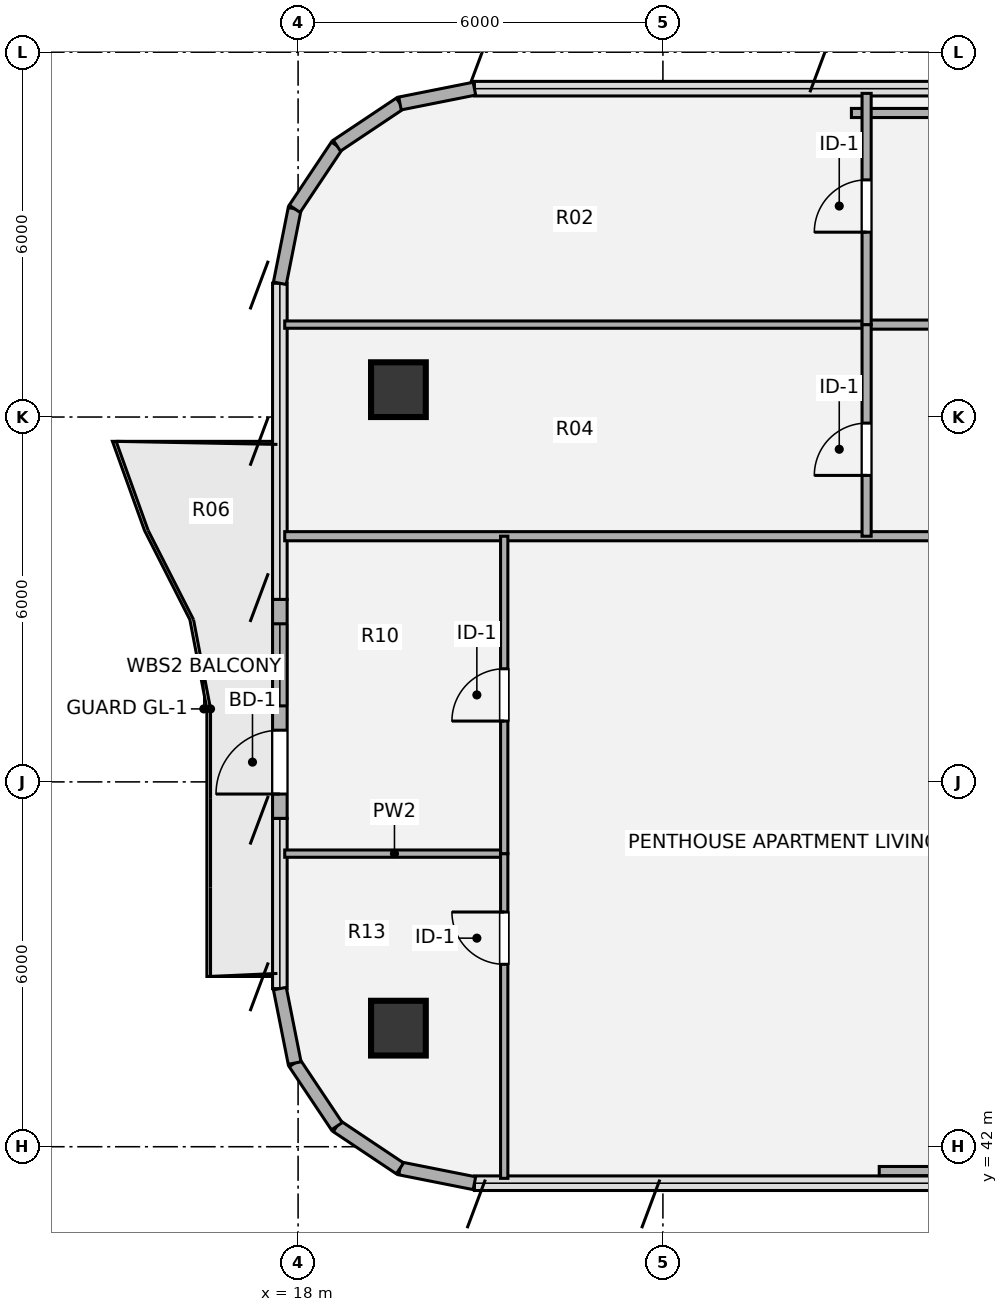
"""IFC4 building model, lengths in metres.
Left out: names, types, materials, properties, quantities, classifications, styles, units other than length and angle.
Written with IfcOpenShell. Run it as: python <this file> out.ifc"""

import sys

from ifc_helpers import new_model, si_unit, direction, frame, frame_2d, origin, origin_2d, place, context, subcontext, project, spatial, rectangle, hollow_circle, extrude, source, transform, mapped, element, fill, save


model = new_model("IFC4")
c1 = context("Model", 3, precision=1e-05, world=origin(), true_north=direction((0.0, 1.0)))
c2 = subcontext(c1, "Body", "Model", "MODEL_VIEW")
j1 = project(units=[si_unit("LENGTHUNIT", "METRE"), si_unit("PLANEANGLEUNIT", "RADIAN")], contexts=[c1])
p1 = place(None, origin())
s1 = spatial("IfcSite", under=j1, at=p1, CompositionType="ELEMENT")
p2 = place(p1, origin())
s2 = spatial("IfcBuilding", under=s1, at=p2, CompositionType="ELEMENT")
p3 = place(p2, frame((0.0, 0.0, 272.16)))
s3 = spatial("IfcBuildingStorey", under=s2, at=p3, CompositionType="ELEMENT", Elevation=272.16)
m1 = source(origin(), c2, "Body", "SweptSolid", [
    extrude(hollow_circle(Radius=0.45, WallThickness=0.032, at=origin_2d()), origin(), (0.0, 0.0, 1.0), 3.78),
])
for number, where, z_axis, x_axis in (
    (1, (19.65, 43.95, 0.0), (0.0, 0.0, 1.0), (1.0, 0.0, 0.0)),
    (2, (19.65, 54.45, 0.0), (0.0, 0.0, 1.0), (1.0, 0.0, 0.0)),
):
    element("IfcColumn", number, at=place(p3, frame(where, z_axis=z_axis, x_axis=x_axis)), inside=s3, PredefinedType="COLUMN", context=c2, shape_type="MappedRepresentation", body=[
        mapped(m1, transform((0.0, 0.0, 0.0), x_axis=(1.0, 0.0, 0.0), y_axis=(0.0, 1.0, 0.0), z_axis=(0.0, 0.0, 1.0), scale=1.0)),
    ])
for number, where, z_axis, x_axis in (
    (3, (20.9, 41.4, 0.0), (0.0, 0.0, 1.0), (-0.981, 0.195, 0.0)),
    (4, (19.675, 41.644, 0.0), (0.0, 0.0, 1.0), (-0.831, 0.556, 0.0)),
    (5, (18.637, 42.337, 0.0), (0.0, 0.0, 1.0), (-0.556, 0.831, 0.0)),
    (6, (17.944, 43.375, 0.0), (0.0, 0.0, 1.0), (-0.195, 0.981, 0.0)),
):
    element("IfcWall", number, at=place(p3, frame(where, z_axis=z_axis, x_axis=x_axis)), inside=s3, PredefinedType="SOLIDWALL", context=c2, shape_type="SweptSolid", body=[
        extrude(rectangle(XDim=1.249, YDim=0.215, at=frame_2d((0.624, 0.0))), origin(), (0.0, 0.0, 1.0), 3.53),
    ])
p4 = place(p3, frame((17.7, 47.4, 0.0), z_axis=(0.0, 0.0, 1.0), x_axis=(0.0, 1.0, 0.0)))
e7 = element("IfcWall", 7, at=p4, inside=s3, PredefinedType="SOLIDWALL", context=c2, shape_type="SweptSolid", body=[
    extrude(rectangle(XDim=3.6, YDim=0.24, at=frame_2d((1.8, 0.0))), origin(), (0.0, 0.0, 1.0), 3.53),
])
p5 = place(p4, frame((0.4, 0.0, 0.0)))
e8 = element("IfcOpeningElement", 8, at=p5, cuts=e7, PredefinedType="OPENING", context=c2, shape_type="SweptSolid", body=[
    extrude(rectangle(XDim=1.05, YDim=2.15, at=origin_2d()), frame((0.525, 0.13, 1.075), z_axis=(0.0, -1.0, 0.0), x_axis=(1.0, 0.0, 0.0)), (0.0, 0.0, 1.0), 0.26),
])
p6 = place(p4, frame((1.85, 0.0, 0.85)))
e9 = element("IfcOpeningElement", 9, at=p6, cuts=e7, PredefinedType="OPENING", context=c2, shape_type="SweptSolid", body=[
    extrude(rectangle(XDim=1.35, YDim=1.35, at=origin_2d()), frame((0.675, 0.13, 0.675), z_axis=(0.0, -1.0, 0.0), x_axis=(1.0, 0.0, 0.0)), (0.0, 0.0, 1.0), 0.26),
])
for number, where, z_axis, x_axis in (
    (10, (17.7, 56.2, 0.0), (0.0, 0.0, 1.0), (0.195, 0.981, 0.0)),
    (11, (17.944, 57.425, 0.0), (0.0, 0.0, 1.0), (0.556, 0.831, 0.0)),
    (12, (18.637, 58.463, 0.0), (0.0, 0.0, 1.0), (0.831, 0.556, 0.0)),
    (13, (19.675, 59.156, 0.0), (0.0, 0.0, 1.0), (0.981, 0.195, 0.0)),
):
    element("IfcWall", number, at=place(p3, frame(where, z_axis=z_axis, x_axis=x_axis)), inside=s3, PredefinedType="SOLIDWALL", context=c2, shape_type="SweptSolid", body=[
        extrude(rectangle(XDim=1.249, YDim=0.215, at=frame_2d((0.624, 0.0))), origin(), (0.0, 0.0, 1.0), 3.53),
    ])
p7 = place(p3, frame((27.558, 41.6, 0.0), z_axis=(0.0, 0.0, 1.0), x_axis=(1.0, 0.0, 0.0)))
e14 = element("IfcWall", 14, at=p7, inside=s3, PredefinedType="PARTITIONING", context=c2, shape_type="SweptSolid", body=[
    extrude(rectangle(XDim=5.992, YDim=0.15, at=frame_2d((2.996, 0.0))), origin(), (0.0, 0.0, 1.0), 3.5),
])
p8 = place(p3, frame((17.78, 46.82, 0.0), z_axis=(0.0, 0.0, 1.0), x_axis=(1.0, 0.0, 0.0)))
e15 = element("IfcWall", 15, at=p8, inside=s3, PredefinedType="PARTITIONING", context=c2, shape_type="SweptSolid", body=[
    extrude(rectangle(XDim=3.61, YDim=0.12, at=frame_2d((1.805, 0.0))), origin(), (0.0, 0.0, 1.0), 2.982),
])
p9 = place(p3, frame((17.78, 52.04, 0.0), z_axis=(0.0, 0.0, 1.0), x_axis=(1.0, 0.0, 0.0)))
e16 = element("IfcWall", 16, at=p9, inside=s3, PredefinedType="PARTITIONING", context=c2, shape_type="SweptSolid", body=[
    extrude(rectangle(XDim=15.77, YDim=0.15, at=frame_2d((7.885, 0.0))), origin(), (0.0, 0.0, 1.0), 2.982),
])
p10 = place(p3, frame((17.78, 55.52, 0.0), z_axis=(0.0, 0.0, 1.0), x_axis=(1.0, 0.0, 0.0)))
e17 = element("IfcWall", 17, at=p10, inside=s3, PredefinedType="PARTITIONING", context=c2, shape_type="SweptSolid", body=[
    extrude(rectangle(XDim=9.57, YDim=0.12, at=frame_2d((4.785, 0.0))), origin(), (0.0, 0.0, 1.0), 3.5),
])
p11 = place(p3, frame((27.35, 55.52, 0.0), z_axis=(0.0, 0.0, 1.0), x_axis=(1.0, 0.0, 0.0)))
e18 = element("IfcWall", 18, at=p11, inside=s3, PredefinedType="PARTITIONING", context=c2, shape_type="SweptSolid", body=[
    extrude(rectangle(XDim=6.2, YDim=0.15, at=frame_2d((3.1, 0.0))), origin(), (0.0, 0.0, 1.0), 3.259),
])
p12 = place(p3, frame((27.1, 59.0, 0.0), z_axis=(0.0, 0.0, 1.0), x_axis=(1.0, 0.0, 0.0)))
e19 = element("IfcWall", 19, at=p12, inside=s3, PredefinedType="PARTITIONING", context=c2, shape_type="SweptSolid", body=[
    extrude(rectangle(XDim=17.8, YDim=0.15, at=frame_2d((8.9, 0.0))), origin(), (0.0, 0.0, 1.0), 3.308),
])
p13 = place(p12, frame((8.375, 0.0, 0.0)))
e20 = element("IfcOpeningElement", 20, at=p13, cuts=e19, PredefinedType="OPENING", context=c2, shape_type="SweptSolid", body=[
    extrude(rectangle(XDim=1.05, YDim=2.1, at=origin_2d()), frame((0.525, 0.085, 1.05), z_axis=(0.0, -1.0, 0.0), x_axis=(1.0, 0.0, 0.0)), (0.0, 0.0, 1.0), 0.17),
])
p14 = place(p3, frame((21.39, 41.48, 0.0), z_axis=(0.0, 0.0, 1.0), x_axis=(0.0, 1.0, 0.0)))
e21 = element("IfcWall", 21, at=p14, inside=s3, PredefinedType="PARTITIONING", context=c2, shape_type="SweptSolid", body=[
    extrude(rectangle(XDim=5.34, YDim=0.12, at=frame_2d((2.67, 0.0))), origin(), (0.0, 0.0, 1.0), 3.5),
])
p15 = place(p14, frame((3.52, 0.0, 0.0)))
e22 = element("IfcOpeningElement", 22, at=p15, cuts=e21, PredefinedType="OPENING", context=c2, shape_type="SweptSolid", body=[
    extrude(rectangle(XDim=0.86, YDim=2.1, at=origin_2d()), frame((0.43, 0.07, 1.05), z_axis=(0.0, -1.0, 0.0), x_axis=(1.0, 0.0, 0.0)), (0.0, 0.0, 1.0), 0.14),
])
p16 = place(p3, frame((21.39, 46.82, 0.0), z_axis=(0.0, 0.0, 1.0), x_axis=(0.0, 1.0, 0.0)))
e23 = element("IfcWall", 23, at=p16, inside=s3, PredefinedType="PARTITIONING", context=c2, shape_type="SweptSolid", body=[
    extrude(rectangle(XDim=5.22, YDim=0.12, at=frame_2d((2.61, 0.0))), origin(), (0.0, 0.0, 1.0), 3.5),
])
p17 = place(p16, frame((2.18, 0.0, 0.0)))
e24 = element("IfcOpeningElement", 24, at=p17, cuts=e23, PredefinedType="OPENING", context=c2, shape_type="SweptSolid", body=[
    extrude(rectangle(XDim=0.86, YDim=2.1, at=origin_2d()), frame((0.43, 0.07, 1.05), z_axis=(0.0, -1.0, 0.0), x_axis=(1.0, 0.0, 0.0)), (0.0, 0.0, 1.0), 0.14),
])
p18 = place(p3, frame((27.35, 52.04, 0.0), z_axis=(0.0, 0.0, 1.0), x_axis=(0.0, 1.0, 0.0)))
e25 = element("IfcWall", 25, at=p18, inside=s3, PredefinedType="PARTITIONING", context=c2, shape_type="SweptSolid", body=[
    extrude(rectangle(XDim=3.48, YDim=0.15, at=frame_2d((1.74, 0.0))), origin(), (0.0, 0.0, 1.0), 3.5),
])
p19 = place(p18, frame((1.0, 0.0, 0.0)))
e26 = element("IfcOpeningElement", 26, at=p19, cuts=e25, PredefinedType="OPENING", context=c2, shape_type="SweptSolid", body=[
    extrude(rectangle(XDim=0.86, YDim=2.1, at=origin_2d()), frame((0.43, 0.085, 1.05), z_axis=(0.0, -1.0, 0.0), x_axis=(1.0, 0.0, 0.0)), (0.0, 0.0, 1.0), 0.17),
])
p20 = place(p3, frame((27.35, 55.52, 0.0), z_axis=(0.0, 0.0, 1.0), x_axis=(0.0, 1.0, 0.0)))
e27 = element("IfcWall", 27, at=p20, inside=s3, PredefinedType="PARTITIONING", context=c2, shape_type="SweptSolid", body=[
    extrude(rectangle(XDim=3.802, YDim=0.15, at=frame_2d((1.901, 0.0))), origin(), (0.0, 0.0, 1.0), 3.5),
])
p21 = place(p20, frame((1.52, 0.0, 0.0)))
e28 = element("IfcOpeningElement", 28, at=p21, cuts=e27, PredefinedType="OPENING", context=c2, shape_type="SweptSolid", body=[
    extrude(rectangle(XDim=0.86, YDim=2.1, at=origin_2d()), frame((0.43, 0.085, 1.05), z_axis=(0.0, -1.0, 0.0), x_axis=(1.0, 0.0, 0.0)), (0.0, 0.0, 1.0), 0.17),
])
m2 = source(origin(), c2, "Body", "SweptSolid", [
    extrude(rectangle(XDim=1.05, YDim=2.15, at=origin_2d()), frame((0.525, 0.025, 1.075), z_axis=(0.0, -1.0, 0.0), x_axis=(1.0, 0.0, 0.0)), (0.0, 0.0, 1.0), 0.05),
])
p22 = place(p5, origin())
e29 = element("IfcDoor", 29, at=p22, inside=s3, OperationType="SINGLE_SWING_LEFT", PredefinedType="DOOR", context=c2, shape_type="MappedRepresentation", body=[
    mapped(m2, transform((0.0, 0.0, 0.0), x_axis=(1.0, 0.0, 0.0), y_axis=(0.0, 1.0, 0.0), z_axis=(0.0, 0.0, 1.0), scale=1.0)),
])
fill(e8, e29)
m3 = source(origin(), c2, "Body", "SweptSolid", [
    extrude(rectangle(XDim=1.35, YDim=1.35, at=origin_2d()), frame((0.675, 0.03, 0.675), z_axis=(0.0, -1.0, 0.0), x_axis=(1.0, 0.0, 0.0)), (0.0, 0.0, 1.0), 0.06),
])
p23 = place(p6, origin())
e30 = element("IfcWindow", 30, at=p23, inside=s3, PartitioningType="SINGLE_PANEL", PredefinedType="WINDOW", context=c2, shape_type="MappedRepresentation", body=[
    mapped(m3, transform((0.0, 0.0, 0.0), x_axis=(1.0, 0.0, 0.0), y_axis=(0.0, 1.0, 0.0), z_axis=(0.0, 0.0, 1.0), scale=1.0)),
])
fill(e9, e30)
m4 = source(origin(), c2, "Body", "SweptSolid", [
    extrude(rectangle(XDim=0.86, YDim=2.1, at=origin_2d()), frame((0.43, 0.025, 1.05), z_axis=(0.0, -1.0, 0.0), x_axis=(1.0, 0.0, 0.0)), (0.0, 0.0, 1.0), 0.05),
])
p24 = place(p15, origin())
e31 = element("IfcDoor", 31, at=p24, inside=s3, OperationType="SINGLE_SWING_RIGHT", PredefinedType="DOOR", context=c2, shape_type="MappedRepresentation", body=[
    mapped(m4, transform((0.0, 0.0, 0.0), x_axis=(1.0, 0.0, 0.0), y_axis=(0.0, 1.0, 0.0), z_axis=(0.0, 0.0, 1.0), scale=1.0)),
])
fill(e22, e31)
p25 = place(p17, origin())
e32 = element("IfcDoor", 32, at=p25, inside=s3, OperationType="SINGLE_SWING_LEFT", PredefinedType="DOOR", context=c2, shape_type="MappedRepresentation", body=[
    mapped(m4, transform((0.0, 0.0, 0.0), x_axis=(1.0, 0.0, 0.0), y_axis=(0.0, 1.0, 0.0), z_axis=(0.0, 0.0, 1.0), scale=1.0)),
])
fill(e24, e32)
p26 = place(p19, origin())
e33 = element("IfcDoor", 33, at=p26, inside=s3, OperationType="SINGLE_SWING_LEFT", PredefinedType="DOOR", context=c2, shape_type="MappedRepresentation", body=[
    mapped(m4, transform((0.0, 0.0, 0.0), x_axis=(1.0, 0.0, 0.0), y_axis=(0.0, 1.0, 0.0), z_axis=(0.0, 0.0, 1.0), scale=1.0)),
])
fill(e26, e33)
p27 = place(p21, origin())
e34 = element("IfcDoor", 34, at=p27, inside=s3, OperationType="SINGLE_SWING_LEFT", PredefinedType="DOOR", context=c2, shape_type="MappedRepresentation", body=[
    mapped(m4, transform((0.0, 0.0, 0.0), x_axis=(1.0, 0.0, 0.0), y_axis=(0.0, 1.0, 0.0), z_axis=(0.0, 0.0, 1.0), scale=1.0)),
])
fill(e28, e34)
save(model, sys.argv[1])
